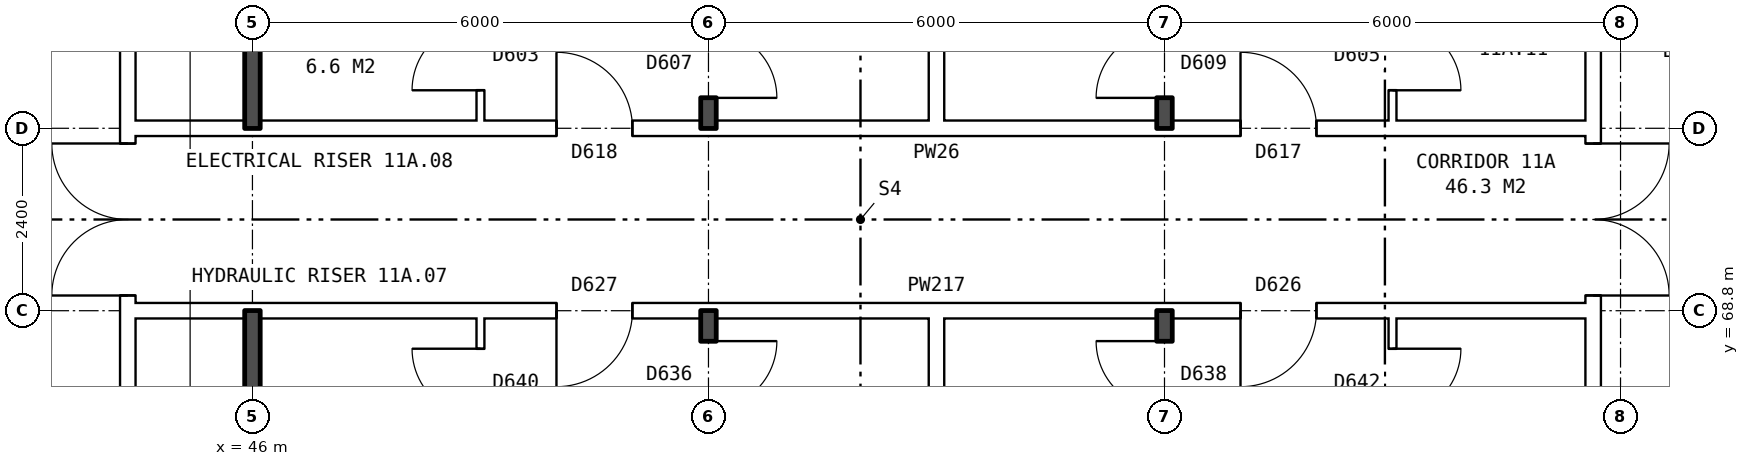
"""IFC4 building model, lengths in metres.
Left out: names, types, materials, properties, quantities, classifications, styles, units other than length and angle.
Written with IfcOpenShell. Run it as: python <this file> out.ifc"""

import sys

from ifc_helpers import new_model, si_unit, direction, frame, frame_2d, origin, place, context, subcontext, project, spatial, rectangle, extrude, element, fill, save


model = new_model("IFC4")
c1 = context("Model", 3, precision=1e-05, world=origin(), true_north=direction((0.0, 1.0)))
c2 = subcontext(c1, "Body", "Model", "MODEL_VIEW")
j1 = project(units=[si_unit("LENGTHUNIT", "METRE"), si_unit("PLANEANGLEUNIT", "RADIAN")], contexts=[c1])
p1 = place(None, origin())
s1 = spatial("IfcSite", under=j1, at=p1, CompositionType="ELEMENT")
p2 = place(p1, origin())
s2 = spatial("IfcBuilding", under=s1, at=p2, CompositionType="ELEMENT")
p3 = place(p2, frame((0.0, 0.0, 44.3)))
s3 = spatial("IfcBuildingStorey", under=s2, at=p3, CompositionType="ELEMENT", Elevation=44.3)
p4 = place(p3, frame((63.64, 63.9, 0.0), z_axis=(0.0, 0.0, 1.0), x_axis=(0.0, 1.0, 0.0)))
e1 = element("IfcWall", 1, at=p4, inside=s3, PredefinedType="PARTITIONING", context=c2, shape_type="SweptSolid", body=[
    extrude(rectangle(XDim=12.2, YDim=0.2, at=frame_2d((6.1, 0.0))), origin(), (0.0, 0.0, 1.0), 2.85),
])
p5 = place(p4, frame((5.1, 0.0, 0.0)))
e2 = element("IfcOpeningElement", 2, at=p5, cuts=e1, PredefinedType="OPENING", context=c2, shape_type="SweptSolid", body=[
    extrude(rectangle(XDim=2.0, YDim=2.1, at=frame_2d((1.0, 1.05))), frame((0.0, 0.11, 0.0), z_axis=(0.0, -1.0, 0.0), x_axis=(1.0, 0.0, 0.0)), (0.0, 0.0, 1.0), 0.22),
])
p6 = place(p3, frame((44.36, 63.9, 0.0), z_axis=(0.0, 0.0, 1.0), x_axis=(0.0, 1.0, 0.0)))
e3 = element("IfcWall", 3, at=p6, inside=s3, PredefinedType="PARTITIONING", context=c2, shape_type="SweptSolid", body=[
    extrude(rectangle(XDim=12.2, YDim=0.2, at=frame_2d((6.1, 0.0))), origin(), (0.0, 0.0, 1.0), 2.85),
])
p7 = place(p6, frame((5.1, 0.0, 0.0)))
e4 = element("IfcOpeningElement", 4, at=p7, cuts=e3, PredefinedType="OPENING", context=c2, shape_type="SweptSolid", body=[
    extrude(rectangle(XDim=2.0, YDim=2.1, at=frame_2d((1.0, 1.05))), frame((0.0, 0.11, 0.0), z_axis=(0.0, -1.0, 0.0), x_axis=(1.0, 0.0, 0.0)), (0.0, 0.0, 1.0), 0.22),
])
p8 = place(p3, frame((44.36, 68.8, 0.0), z_axis=(0.0, 0.0, 1.0), x_axis=(1.0, 0.0, 0.0)))
e5 = element("IfcWall", 5, at=p8, inside=s3, PredefinedType="PARTITIONING", context=c2, shape_type="SweptSolid", body=[
    extrude(rectangle(XDim=19.28, YDim=0.2, at=frame_2d((9.64, 0.0))), origin(), (0.0, 0.0, 1.0), 2.85),
])
p9 = place(p8, frame((14.64, 0.0, 0.0)))
e6 = element("IfcOpeningElement", 6, at=p9, cuts=e5, PredefinedType="OPENING", context=c2, shape_type="SweptSolid", body=[
    extrude(rectangle(XDim=1.0, YDim=2.1, at=frame_2d((0.5, 1.05))), frame((0.0, 0.11, 0.0), z_axis=(0.0, -1.0, 0.0), x_axis=(1.0, 0.0, 0.0)), (0.0, 0.0, 1.0), 0.22),
])
p10 = place(p8, frame((5.64, 0.0, 0.0)))
e7 = element("IfcOpeningElement", 7, at=p10, cuts=e5, PredefinedType="OPENING", context=c2, shape_type="SweptSolid", body=[
    extrude(rectangle(XDim=1.0, YDim=2.1, at=frame_2d((0.5, 1.05))), frame((0.0, 0.11, 0.0), z_axis=(0.0, -1.0, 0.0), x_axis=(1.0, 0.0, 0.0)), (0.0, 0.0, 1.0), 0.22),
])
p11 = place(p3, frame((44.36, 71.2, 0.0), z_axis=(0.0, 0.0, 1.0), x_axis=(1.0, 0.0, 0.0)))
e8 = element("IfcWall", 8, at=p11, inside=s3, PredefinedType="PARTITIONING", context=c2, shape_type="SweptSolid", body=[
    extrude(rectangle(XDim=19.28, YDim=0.2, at=frame_2d((9.64, 0.0))), origin(), (0.0, 0.0, 1.0), 2.85),
])
p12 = place(p11, frame((14.64, 0.0, 0.0)))
e9 = element("IfcOpeningElement", 9, at=p12, cuts=e8, PredefinedType="OPENING", context=c2, shape_type="SweptSolid", body=[
    extrude(rectangle(XDim=1.0, YDim=2.1, at=frame_2d((0.5, 1.05))), frame((0.0, 0.11, 0.0), z_axis=(0.0, -1.0, 0.0), x_axis=(1.0, 0.0, 0.0)), (0.0, 0.0, 1.0), 0.22),
])
p13 = place(p11, frame((5.64, 0.0, 0.0)))
e10 = element("IfcOpeningElement", 10, at=p13, cuts=e8, PredefinedType="OPENING", context=c2, shape_type="SweptSolid", body=[
    extrude(rectangle(XDim=1.0, YDim=2.1, at=frame_2d((0.5, 1.05))), frame((0.0, 0.11, 0.0), z_axis=(0.0, -1.0, 0.0), x_axis=(1.0, 0.0, 0.0)), (0.0, 0.0, 1.0), 0.22),
])
for number, where, z_axis, x_axis in (
    (11, (46.0, 63.8, 0.0), (0.0, 0.0, 1.0), (0.0, 1.0, 0.0)),
    (12, (46.0, 71.2, 0.0), (0.0, 0.0, 1.0), (0.0, 1.0, 0.0)),
):
    element("IfcWall", number, at=place(p3, frame(where, z_axis=z_axis, x_axis=x_axis)), inside=s3, PredefinedType="SOLIDWALL", context=c2, shape_type="SweptSolid", body=[
        extrude(rectangle(XDim=5.0, YDim=0.2, at=frame_2d((2.5, 0.0))), origin(), (0.0, 0.0, 1.0), 2.85),
    ])
p14 = place(p3, frame((49.0, 54.36, 0.0), z_axis=(0.0, 0.0, 1.0), x_axis=(0.0, 1.0, 0.0)))
e13 = element("IfcWall", 13, at=p14, inside=s3, PredefinedType="PARTITIONING", context=c2, shape_type="SweptSolid", body=[
    extrude(rectangle(XDim=14.34, YDim=0.1, at=frame_2d((7.17, 0.0))), origin(), (0.0, 0.0, 1.0), 2.85),
])
p15 = place(p14, frame((6.7, 0.0, 0.0)))
e14 = element("IfcOpeningElement", 14, at=p15, cuts=e13, PredefinedType="OPENING", context=c2, shape_type="SweptSolid", body=[
    extrude(rectangle(XDim=0.9, YDim=2.1, at=frame_2d((0.45, 1.05))), frame((0.0, 0.06, 0.0), z_axis=(0.0, -1.0, 0.0), x_axis=(1.0, 0.0, 0.0)), (0.0, 0.0, 1.0), 0.12),
])
p16 = place(p14, frame((13.04, 0.0, 0.0)))
e15 = element("IfcOpeningElement", 15, at=p16, cuts=e13, PredefinedType="OPENING", context=c2, shape_type="SweptSolid", body=[
    extrude(rectangle(XDim=0.9, YDim=2.1, at=frame_2d((0.45, 1.05))), frame((0.0, 0.06, 0.0), z_axis=(0.0, -1.0, 0.0), x_axis=(1.0, 0.0, 0.0)), (0.0, 0.0, 1.0), 0.12),
])
p17 = place(p3, frame((49.0, 71.3, 0.0), z_axis=(0.0, 0.0, 1.0), x_axis=(0.0, 1.0, 0.0)))
e16 = element("IfcWall", 16, at=p17, inside=s3, PredefinedType="PARTITIONING", context=c2, shape_type="SweptSolid", body=[
    extrude(rectangle(XDim=14.34, YDim=0.1, at=frame_2d((7.17, 0.0))), origin(), (0.0, 0.0, 1.0), 2.85),
])
p18 = place(p17, frame((6.74, 0.0, 0.0)))
e17 = element("IfcOpeningElement", 17, at=p18, cuts=e16, PredefinedType="OPENING", context=c2, shape_type="SweptSolid", body=[
    extrude(rectangle(XDim=0.9, YDim=2.1, at=frame_2d((0.45, 1.05))), frame((0.0, 0.06, 0.0), z_axis=(0.0, -1.0, 0.0), x_axis=(1.0, 0.0, 0.0)), (0.0, 0.0, 1.0), 0.12),
])
p19 = place(p17, frame((0.4, 0.0, 0.0)))
e18 = element("IfcOpeningElement", 18, at=p19, cuts=e16, PredefinedType="OPENING", context=c2, shape_type="SweptSolid", body=[
    extrude(rectangle(XDim=0.9, YDim=2.1, at=frame_2d((0.45, 1.05))), frame((0.0, 0.06, 0.0), z_axis=(0.0, -1.0, 0.0), x_axis=(1.0, 0.0, 0.0)), (0.0, 0.0, 1.0), 0.12),
])
p20 = place(p3, frame((52.0, 54.36, 0.0), z_axis=(0.0, 0.0, 1.0), x_axis=(0.0, 1.0, 0.0)))
e19 = element("IfcWall", 19, at=p20, inside=s3, PredefinedType="SOLIDWALL", context=c2, shape_type="SweptSolid", body=[
    extrude(rectangle(XDim=14.44, YDim=0.2, at=frame_2d((7.22, 0.0))), origin(), (0.0, 0.0, 1.0), 2.85),
])
p21 = place(p20, frame((6.7, 0.0, 0.0)))
e20 = element("IfcOpeningElement", 20, at=p21, cuts=e19, PredefinedType="OPENING", context=c2, shape_type="SweptSolid", body=[
    extrude(rectangle(XDim=0.9, YDim=2.1, at=frame_2d((0.45, 1.05))), frame((0.0, 0.11, 0.0), z_axis=(0.0, -1.0, 0.0), x_axis=(1.0, 0.0, 0.0)), (0.0, 0.0, 1.0), 0.22),
])
p22 = place(p20, frame((13.14, 0.0, 0.0)))
e21 = element("IfcOpeningElement", 21, at=p22, cuts=e19, PredefinedType="OPENING", context=c2, shape_type="SweptSolid", body=[
    extrude(rectangle(XDim=0.9, YDim=2.1, at=frame_2d((0.45, 1.05))), frame((0.0, 0.11, 0.0), z_axis=(0.0, -1.0, 0.0), x_axis=(1.0, 0.0, 0.0)), (0.0, 0.0, 1.0), 0.22),
])
p23 = place(p3, frame((52.0, 71.2, 0.0), z_axis=(0.0, 0.0, 1.0), x_axis=(0.0, 1.0, 0.0)))
e22 = element("IfcWall", 22, at=p23, inside=s3, PredefinedType="SOLIDWALL", context=c2, shape_type="SweptSolid", body=[
    extrude(rectangle(XDim=14.44, YDim=0.2, at=frame_2d((7.22, 0.0))), origin(), (0.0, 0.0, 1.0), 2.85),
])
p24 = place(p23, frame((6.84, 0.0, 0.0)))
e23 = element("IfcOpeningElement", 23, at=p24, cuts=e22, PredefinedType="OPENING", context=c2, shape_type="SweptSolid", body=[
    extrude(rectangle(XDim=0.9, YDim=2.1, at=frame_2d((0.45, 1.05))), frame((0.0, 0.11, 0.0), z_axis=(0.0, -1.0, 0.0), x_axis=(1.0, 0.0, 0.0)), (0.0, 0.0, 1.0), 0.22),
])
p25 = place(p23, frame((0.4, 0.0, 0.0)))
e24 = element("IfcOpeningElement", 24, at=p25, cuts=e22, PredefinedType="OPENING", context=c2, shape_type="SweptSolid", body=[
    extrude(rectangle(XDim=0.9, YDim=2.1, at=frame_2d((0.45, 1.05))), frame((0.0, 0.11, 0.0), z_axis=(0.0, -1.0, 0.0), x_axis=(1.0, 0.0, 0.0)), (0.0, 0.0, 1.0), 0.22),
])
for number, where, z_axis, x_axis in (
    (25, (55.0, 54.36, 0.0), (0.0, 0.0, 1.0), (0.0, 1.0, 0.0)),
    (26, (55.0, 71.3, 0.0), (0.0, 0.0, 1.0), (0.0, 1.0, 0.0)),
):
    element("IfcWall", number, at=place(p3, frame(where, z_axis=z_axis, x_axis=x_axis)), inside=s3, PredefinedType="PARTITIONING", context=c2, shape_type="SweptSolid", body=[
        extrude(rectangle(XDim=14.34, YDim=0.2, at=frame_2d((7.17, 0.0))), origin(), (0.0, 0.0, 1.0), 2.85),
    ])
p26 = place(p3, frame((58.0, 54.36, 0.0), z_axis=(0.0, 0.0, 1.0), x_axis=(0.0, 1.0, 0.0)))
e27 = element("IfcWall", 27, at=p26, inside=s3, PredefinedType="SOLIDWALL", context=c2, shape_type="SweptSolid", body=[
    extrude(rectangle(XDim=14.44, YDim=0.2, at=frame_2d((7.22, 0.0))), origin(), (0.0, 0.0, 1.0), 2.85),
])
p27 = place(p26, frame((6.7, 0.0, 0.0)))
e28 = element("IfcOpeningElement", 28, at=p27, cuts=e27, PredefinedType="OPENING", context=c2, shape_type="SweptSolid", body=[
    extrude(rectangle(XDim=0.9, YDim=2.1, at=frame_2d((0.45, 1.05))), frame((0.0, 0.11, 0.0), z_axis=(0.0, -1.0, 0.0), x_axis=(1.0, 0.0, 0.0)), (0.0, 0.0, 1.0), 0.22),
])
p28 = place(p26, frame((13.14, 0.0, 0.0)))
e29 = element("IfcOpeningElement", 29, at=p28, cuts=e27, PredefinedType="OPENING", context=c2, shape_type="SweptSolid", body=[
    extrude(rectangle(XDim=0.9, YDim=2.1, at=frame_2d((0.45, 1.05))), frame((0.0, 0.11, 0.0), z_axis=(0.0, -1.0, 0.0), x_axis=(1.0, 0.0, 0.0)), (0.0, 0.0, 1.0), 0.22),
])
p29 = place(p3, frame((58.0, 71.2, 0.0), z_axis=(0.0, 0.0, 1.0), x_axis=(0.0, 1.0, 0.0)))
e30 = element("IfcWall", 30, at=p29, inside=s3, PredefinedType="SOLIDWALL", context=c2, shape_type="SweptSolid", body=[
    extrude(rectangle(XDim=14.44, YDim=0.2, at=frame_2d((7.22, 0.0))), origin(), (0.0, 0.0, 1.0), 2.85),
])
p30 = place(p29, frame((8.04, 0.0, 0.0)))
e31 = element("IfcOpeningElement", 31, at=p30, cuts=e30, PredefinedType="OPENING", context=c2, shape_type="SweptSolid", body=[
    extrude(rectangle(XDim=0.9, YDim=2.1, at=frame_2d((0.45, 1.05))), frame((0.0, 0.11, 0.0), z_axis=(0.0, -1.0, 0.0), x_axis=(1.0, 0.0, 0.0)), (0.0, 0.0, 1.0), 0.22),
])
p31 = place(p29, frame((0.4, 0.0, 0.0)))
e32 = element("IfcOpeningElement", 32, at=p31, cuts=e30, PredefinedType="OPENING", context=c2, shape_type="SweptSolid", body=[
    extrude(rectangle(XDim=0.9, YDim=2.1, at=frame_2d((0.45, 1.05))), frame((0.0, 0.11, 0.0), z_axis=(0.0, -1.0, 0.0), x_axis=(1.0, 0.0, 0.0)), (0.0, 0.0, 1.0), 0.22),
])
p32 = place(p3, frame((61.0, 54.36, 0.0), z_axis=(0.0, 0.0, 1.0), x_axis=(0.0, 1.0, 0.0)))
e33 = element("IfcWall", 33, at=p32, inside=s3, PredefinedType="PARTITIONING", context=c2, shape_type="SweptSolid", body=[
    extrude(rectangle(XDim=14.34, YDim=0.1, at=frame_2d((7.17, 0.0))), origin(), (0.0, 0.0, 1.0), 2.85),
])
p33 = place(p32, frame((6.7, 0.0, 0.0)))
e34 = element("IfcOpeningElement", 34, at=p33, cuts=e33, PredefinedType="OPENING", context=c2, shape_type="SweptSolid", body=[
    extrude(rectangle(XDim=0.9, YDim=2.1, at=frame_2d((0.45, 1.05))), frame((0.0, 0.06, 0.0), z_axis=(0.0, -1.0, 0.0), x_axis=(1.0, 0.0, 0.0)), (0.0, 0.0, 1.0), 0.12),
])
p34 = place(p32, frame((13.04, 0.0, 0.0)))
e35 = element("IfcOpeningElement", 35, at=p34, cuts=e33, PredefinedType="OPENING", context=c2, shape_type="SweptSolid", body=[
    extrude(rectangle(XDim=0.9, YDim=2.1, at=frame_2d((0.45, 1.05))), frame((0.0, 0.06, 0.0), z_axis=(0.0, -1.0, 0.0), x_axis=(1.0, 0.0, 0.0)), (0.0, 0.0, 1.0), 0.12),
])
p35 = place(p3, frame((61.0, 71.3, 0.0), z_axis=(0.0, 0.0, 1.0), x_axis=(0.0, 1.0, 0.0)))
e36 = element("IfcWall", 36, at=p35, inside=s3, PredefinedType="PARTITIONING", context=c2, shape_type="SweptSolid", body=[
    extrude(rectangle(XDim=14.34, YDim=0.1, at=frame_2d((7.17, 0.0))), origin(), (0.0, 0.0, 1.0), 2.85),
])
p36 = place(p35, frame((7.94, 0.0, 0.0)))
e37 = element("IfcOpeningElement", 37, at=p36, cuts=e36, PredefinedType="OPENING", context=c2, shape_type="SweptSolid", body=[
    extrude(rectangle(XDim=0.9, YDim=2.1, at=frame_2d((0.45, 1.05))), frame((0.0, 0.06, 0.0), z_axis=(0.0, -1.0, 0.0), x_axis=(1.0, 0.0, 0.0)), (0.0, 0.0, 1.0), 0.12),
])
p37 = place(p35, frame((0.4, 0.0, 0.0)))
e38 = element("IfcOpeningElement", 38, at=p37, cuts=e36, PredefinedType="OPENING", context=c2, shape_type="SweptSolid", body=[
    extrude(rectangle(XDim=0.9, YDim=2.1, at=frame_2d((0.45, 1.05))), frame((0.0, 0.06, 0.0), z_axis=(0.0, -1.0, 0.0), x_axis=(1.0, 0.0, 0.0)), (0.0, 0.0, 1.0), 0.12),
])
p38 = place(p5, frame((2.0, 0.0, 0.0), z_axis=(0.0, 0.0, 1.0), x_axis=(-1.0, 0.0, 0.0)))
e39 = element("IfcDoor", 39, at=p38, inside=s3, OperationType="DOUBLE_DOOR_SINGLE_SWING", PredefinedType="DOOR", context=c2, shape_type="SweptSolid", body=[
    extrude(rectangle(XDim=2.0, YDim=2.1, at=frame_2d((1.0, 1.05))), frame((0.0, 0.025, 0.0), z_axis=(0.0, -1.0, 0.0), x_axis=(1.0, 0.0, 0.0)), (0.0, 0.0, 1.0), 0.05),
])
fill(e2, e39)
p39 = place(p7, origin())
e40 = element("IfcDoor", 40, at=p39, inside=s3, OperationType="DOUBLE_DOOR_SINGLE_SWING", PredefinedType="DOOR", context=c2, shape_type="SweptSolid", body=[
    extrude(rectangle(XDim=2.0, YDim=2.1, at=frame_2d((1.0, 1.05))), frame((0.0, 0.025, 0.0), z_axis=(0.0, -1.0, 0.0), x_axis=(1.0, 0.0, 0.0)), (0.0, 0.0, 1.0), 0.05),
])
fill(e4, e40)
p40 = place(p9, frame((1.0, 0.0, 0.0), z_axis=(0.0, 0.0, 1.0), x_axis=(-1.0, 0.0, 0.0)))
e41 = element("IfcDoor", 41, at=p40, inside=s3, OperationType="SINGLE_SWING_RIGHT", PredefinedType="DOOR", context=c2, shape_type="SweptSolid", body=[
    extrude(rectangle(XDim=1.0, YDim=2.1, at=frame_2d((0.5, 1.05))), frame((0.0, 0.025, 0.0), z_axis=(0.0, -1.0, 0.0), x_axis=(1.0, 0.0, 0.0)), (0.0, 0.0, 1.0), 0.05),
])
fill(e6, e41)
p41 = place(p34, frame((0.9, 0.0, 0.0), z_axis=(0.0, 0.0, 1.0), x_axis=(-1.0, 0.0, 0.0)))
e42 = element("IfcDoor", 42, at=p41, inside=s3, OperationType="SINGLE_SWING_LEFT", PredefinedType="DOOR", context=c2, shape_type="SweptSolid", body=[
    extrude(rectangle(XDim=0.9, YDim=2.1, at=frame_2d((0.45, 1.05))), frame((0.0, 0.025, 0.0), z_axis=(0.0, -1.0, 0.0), x_axis=(1.0, 0.0, 0.0)), (0.0, 0.0, 1.0), 0.05),
])
fill(e35, e42)
p42 = place(p28, origin())
e43 = element("IfcDoor", 43, at=p42, inside=s3, OperationType="SINGLE_SWING_RIGHT", PredefinedType="DOOR", context=c2, shape_type="SweptSolid", body=[
    extrude(rectangle(XDim=0.9, YDim=2.1, at=frame_2d((0.45, 1.05))), frame((0.0, 0.025, 0.0), z_axis=(0.0, -1.0, 0.0), x_axis=(1.0, 0.0, 0.0)), (0.0, 0.0, 1.0), 0.05),
])
fill(e29, e43)
p43 = place(p10, frame((1.0, 0.0, 0.0), z_axis=(0.0, 0.0, 1.0), x_axis=(-1.0, 0.0, 0.0)))
e44 = element("IfcDoor", 44, at=p43, inside=s3, OperationType="SINGLE_SWING_RIGHT", PredefinedType="DOOR", context=c2, shape_type="SweptSolid", body=[
    extrude(rectangle(XDim=1.0, YDim=2.1, at=frame_2d((0.5, 1.05))), frame((0.0, 0.025, 0.0), z_axis=(0.0, -1.0, 0.0), x_axis=(1.0, 0.0, 0.0)), (0.0, 0.0, 1.0), 0.05),
])
fill(e7, e44)
p44 = place(p22, frame((0.9, 0.0, 0.0), z_axis=(0.0, 0.0, 1.0), x_axis=(-1.0, 0.0, 0.0)))
e45 = element("IfcDoor", 45, at=p44, inside=s3, OperationType="SINGLE_SWING_LEFT", PredefinedType="DOOR", context=c2, shape_type="SweptSolid", body=[
    extrude(rectangle(XDim=0.9, YDim=2.1, at=frame_2d((0.45, 1.05))), frame((0.0, 0.025, 0.0), z_axis=(0.0, -1.0, 0.0), x_axis=(1.0, 0.0, 0.0)), (0.0, 0.0, 1.0), 0.05),
])
fill(e21, e45)
p45 = place(p16, origin())
e46 = element("IfcDoor", 46, at=p45, inside=s3, OperationType="SINGLE_SWING_RIGHT", PredefinedType="DOOR", context=c2, shape_type="SweptSolid", body=[
    extrude(rectangle(XDim=0.9, YDim=2.1, at=frame_2d((0.45, 1.05))), frame((0.0, 0.025, 0.0), z_axis=(0.0, -1.0, 0.0), x_axis=(1.0, 0.0, 0.0)), (0.0, 0.0, 1.0), 0.05),
])
fill(e15, e46)
p46 = place(p12, origin())
e47 = element("IfcDoor", 47, at=p46, inside=s3, OperationType="SINGLE_SWING_LEFT", PredefinedType="DOOR", context=c2, shape_type="SweptSolid", body=[
    extrude(rectangle(XDim=1.0, YDim=2.1, at=frame_2d((0.5, 1.05))), frame((0.0, 0.025, 0.0), z_axis=(0.0, -1.0, 0.0), x_axis=(1.0, 0.0, 0.0)), (0.0, 0.0, 1.0), 0.05),
])
fill(e9, e47)
p47 = place(p37, frame((0.9, 0.0, 0.0), z_axis=(0.0, 0.0, 1.0), x_axis=(-1.0, 0.0, 0.0)))
e48 = element("IfcDoor", 48, at=p47, inside=s3, OperationType="SINGLE_SWING_RIGHT", PredefinedType="DOOR", context=c2, shape_type="SweptSolid", body=[
    extrude(rectangle(XDim=0.9, YDim=2.1, at=frame_2d((0.45, 1.05))), frame((0.0, 0.025, 0.0), z_axis=(0.0, -1.0, 0.0), x_axis=(1.0, 0.0, 0.0)), (0.0, 0.0, 1.0), 0.05),
])
fill(e38, e48)
p48 = place(p31, origin())
e49 = element("IfcDoor", 49, at=p48, inside=s3, OperationType="SINGLE_SWING_LEFT", PredefinedType="DOOR", context=c2, shape_type="SweptSolid", body=[
    extrude(rectangle(XDim=0.9, YDim=2.1, at=frame_2d((0.45, 1.05))), frame((0.0, 0.025, 0.0), z_axis=(0.0, -1.0, 0.0), x_axis=(1.0, 0.0, 0.0)), (0.0, 0.0, 1.0), 0.05),
])
fill(e32, e49)
p49 = place(p13, origin())
e50 = element("IfcDoor", 50, at=p49, inside=s3, OperationType="SINGLE_SWING_LEFT", PredefinedType="DOOR", context=c2, shape_type="SweptSolid", body=[
    extrude(rectangle(XDim=1.0, YDim=2.1, at=frame_2d((0.5, 1.05))), frame((0.0, 0.025, 0.0), z_axis=(0.0, -1.0, 0.0), x_axis=(1.0, 0.0, 0.0)), (0.0, 0.0, 1.0), 0.05),
])
fill(e10, e50)
p50 = place(p25, frame((0.9, 0.0, 0.0), z_axis=(0.0, 0.0, 1.0), x_axis=(-1.0, 0.0, 0.0)))
e51 = element("IfcDoor", 51, at=p50, inside=s3, OperationType="SINGLE_SWING_RIGHT", PredefinedType="DOOR", context=c2, shape_type="SweptSolid", body=[
    extrude(rectangle(XDim=0.9, YDim=2.1, at=frame_2d((0.45, 1.05))), frame((0.0, 0.025, 0.0), z_axis=(0.0, -1.0, 0.0), x_axis=(1.0, 0.0, 0.0)), (0.0, 0.0, 1.0), 0.05),
])
fill(e24, e51)
p51 = place(p19, origin())
e52 = element("IfcDoor", 52, at=p51, inside=s3, OperationType="SINGLE_SWING_LEFT", PredefinedType="DOOR", context=c2, shape_type="SweptSolid", body=[
    extrude(rectangle(XDim=0.9, YDim=2.1, at=frame_2d((0.45, 1.05))), frame((0.0, 0.025, 0.0), z_axis=(0.0, -1.0, 0.0), x_axis=(1.0, 0.0, 0.0)), (0.0, 0.0, 1.0), 0.05),
])
fill(e18, e52)
save(model, sys.argv[1])
